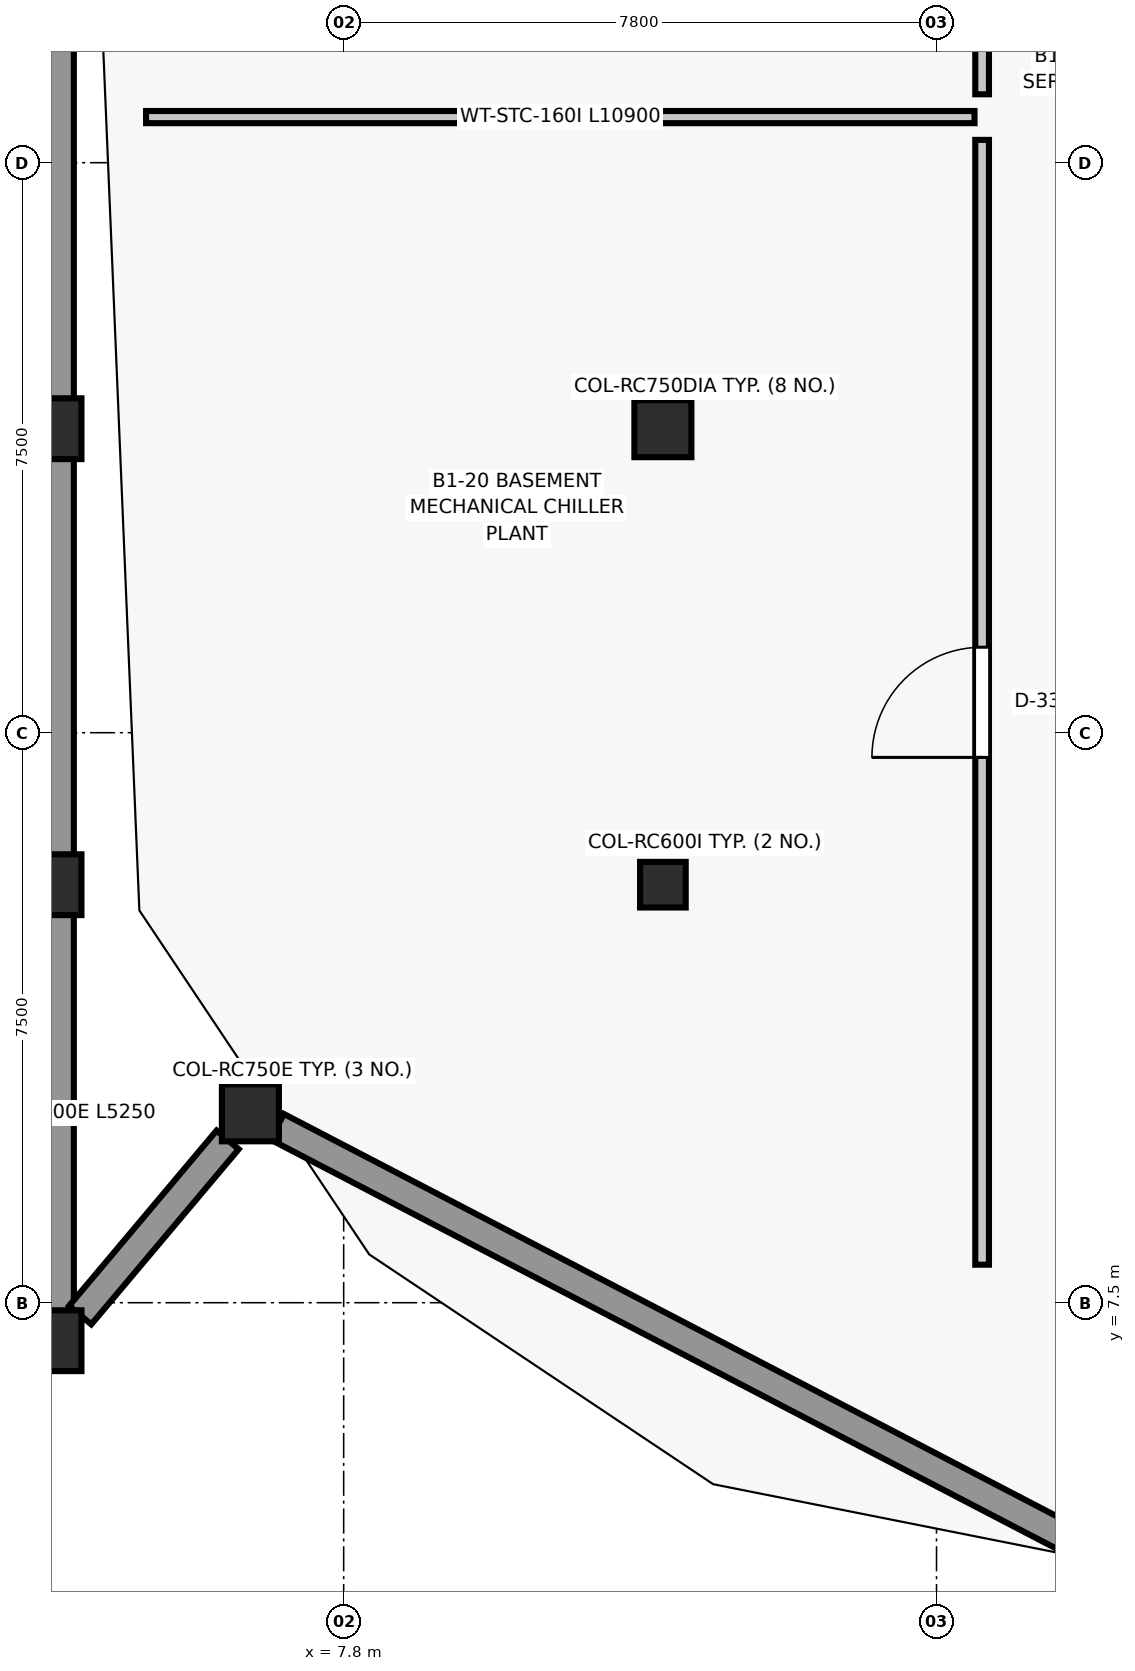
"""IFC4 building model, lengths in metres.
Left out: names, types, materials, properties, quantities, classifications, styles, units other than length and angle.
Written with IfcOpenShell. Run it as: python <this file> out.ifc"""

import sys

from ifc_helpers import new_model, si_unit, direction, frame, frame_2d, origin, origin_2d, place, context, subcontext, project, spatial, rectangle, circle, extrude, element, fill, save


model = new_model("IFC4")
c1 = context("Model", 3, precision=1e-05, world=origin(), true_north=direction((0.0, 1.0)))
c2 = subcontext(c1, "Body", "Model", "MODEL_VIEW")
j1 = project(units=[si_unit("LENGTHUNIT", "METRE"), si_unit("PLANEANGLEUNIT", "RADIAN")], contexts=[c1])
p1 = place(None, origin())
s1 = spatial("IfcSite", under=j1, at=p1, CompositionType="ELEMENT")
p2 = place(p1, origin())
s2 = spatial("IfcBuilding", under=s1, at=p2, CompositionType="ELEMENT")
p3 = place(p2, frame((0.0, 0.0, -4.2)))
s3 = spatial("IfcBuildingStorey", under=s2, at=p3, CompositionType="ELEMENT", Elevation=-4.2)
p4 = place(p3, frame((6.573, 9.999, 0.0), z_axis=(0.0, 0.0, 1.0), x_axis=(1.0, 0.0, 0.0)))
e1 = element("IfcColumn", 1, at=p4, inside=s3, PredefinedType="COLUMN", context=c2, shape_type="SweptSolid", body=[
    extrude(rectangle(XDim=0.75, YDim=0.75, at=origin_2d()), origin(), (0.0, 0.0, 1.0), 4.2),
])
p5 = place(p3, frame((12.0, 13.0, 0.0), z_axis=(0.0, 0.0, 1.0), x_axis=(1.0, 0.0, 0.0)))
e2 = element("IfcColumn", 2, at=p5, inside=s3, PredefinedType="COLUMN", context=c2, shape_type="SweptSolid", body=[
    extrude(rectangle(XDim=0.6, YDim=0.6, at=origin_2d()), origin(), (0.0, 0.0, 1.0), 4.2),
])
p6 = place(p3, frame((12.0, 19.0, 0.0), z_axis=(0.0, 0.0, 1.0), x_axis=(1.0, 0.0, 0.0)))
e3 = element("IfcColumn", 3, at=p6, inside=s3, PredefinedType="COLUMN", context=c2, shape_type="SweptSolid", body=[
    extrude(circle(Radius=0.375, at=origin_2d()), origin(), (0.0, 0.0, 1.0), 4.2),
])
for number, where, z_axis, x_axis in (
    (4, (4.05, 7.0, 0.0), (0.0, 0.0, 1.0), (1.0, 0.0, 0.0)),
    (5, (4.05, 13.0, 0.0), (0.0, 0.0, 1.0), (1.0, 0.0, 0.0)),
    (6, (4.05, 19.0, 0.0), (0.0, 0.0, 1.0), (1.0, 0.0, 0.0)),
):
    element("IfcColumn", number, at=place(p3, frame(where, z_axis=z_axis, x_axis=x_axis)), inside=s3, PredefinedType="COLUMN", context=c2, shape_type="SweptSolid", body=[
        extrude(rectangle(XDim=0.6, YDim=0.8, at=origin_2d()), origin(), (0.0, 0.0, 1.0), 4.2),
    ])
for number, where, z_axis, x_axis in (
    (7, (4.05, 7.375, 0.0), (0.0, 0.0, 1.0), (0.0, 1.0, 0.0)),
    (8, (4.05, 13.375, 0.0), (0.0, 0.0, 1.0), (0.0, 1.0, 0.0)),
    (9, (4.05, 19.375, 0.0), (0.0, 0.0, 1.0), (0.0, 1.0, 0.0)),
):
    element("IfcWall", number, at=place(p3, frame(where, z_axis=z_axis, x_axis=x_axis)), inside=s3, PredefinedType="SHEAR", context=c2, shape_type="SweptSolid", body=[
        extrude(rectangle(XDim=5.25, YDim=0.4, at=frame_2d((2.625, 0.0))), origin(), (0.0, 0.0, 1.0), 4.2),
    ])
p7 = place(p3, frame((17.647, 4.234, 0.0), z_axis=(0.0, 0.0, 1.0), x_axis=(-0.887012674584, 0.46174507591, 0.0)))
e10 = element("IfcWall", 10, at=p7, inside=s3, PredefinedType="SHEAR", context=c2, shape_type="SweptSolid", body=[
    extrude(rectangle(XDim=12.087, YDim=0.38, at=frame_2d((6.044, 0.0))), origin(), (0.0, 0.0, 1.0), 4.2),
])
p8 = place(p3, frame((6.273, 9.643, 0.0), z_axis=(0.0, 0.0, 1.0), x_axis=(-0.643796278673, -0.765196936459, 0.0)))
e11 = element("IfcWall", 11, at=p8, inside=s3, PredefinedType="SHEAR", context=c2, shape_type="SweptSolid", body=[
    extrude(rectangle(XDim=3.012, YDim=0.38, at=frame_2d((1.506, 0.0))), origin(), (0.0, 0.0, 1.0), 4.2),
])
p9 = place(p3, frame((16.2, 8.0, 0.0), z_axis=(0.0, 0.0, 1.0), x_axis=(0.0, 1.0, 0.0)))
e12 = element("IfcWall", 12, at=p9, inside=s3, PredefinedType="PARTITIONING", context=c2, shape_type="SweptSolid", body=[
    extrude(rectangle(XDim=14.8, YDim=0.18, at=frame_2d((7.4, 0.0))), origin(), (0.0, 0.0, 1.0), 3.895),
])
p10 = place(p9, frame((6.675, 0.0, 0.0)))
e13 = element("IfcOpeningElement", 13, at=p10, cuts=e12, PredefinedType="OPENING", context=c2, shape_type="SweptSolid", body=[
    extrude(rectangle(XDim=1.45, YDim=2.2, at=frame_2d((0.725, 1.1))), frame((0.0, 0.1, 0.0), z_axis=(0.0, -1.0, 0.0), x_axis=(1.0, 0.0, 0.0)), (0.0, 0.0, 1.0), 0.2),
])
p11 = place(p3, frame((16.2, 23.4, 0.0), z_axis=(0.0, 0.0, 1.0), x_axis=(0.0, 1.0, 0.0)))
e14 = element("IfcWall", 14, at=p11, inside=s3, PredefinedType="PARTITIONING", context=c2, shape_type="SweptSolid", body=[
    extrude(rectangle(XDim=16.6, YDim=0.18, at=frame_2d((8.3, 0.0))), origin(), (0.0, 0.0, 1.0), 3.895),
])
p12 = place(p11, frame((7.575, 0.0, 0.0)))
e15 = element("IfcOpeningElement", 15, at=p12, cuts=e14, PredefinedType="OPENING", context=c2, shape_type="SweptSolid", body=[
    extrude(rectangle(XDim=1.45, YDim=2.2, at=frame_2d((0.725, 1.1))), frame((0.0, 0.1, 0.0), z_axis=(0.0, -1.0, 0.0), x_axis=(1.0, 0.0, 0.0)), (0.0, 0.0, 1.0), 0.2),
])
p13 = place(p3, frame((5.2, 23.1, 0.0), z_axis=(0.0, 0.0, 1.0), x_axis=(1.0, 0.0, 0.0)))
e16 = element("IfcWall", 16, at=p13, inside=s3, PredefinedType="PARTITIONING", context=c2, shape_type="SweptSolid", body=[
    extrude(rectangle(XDim=10.9, YDim=0.16, at=frame_2d((5.45, 0.0))), origin(), (0.0, 0.0, 1.0), 3.895),
])
p14 = place(p10, origin())
e17 = element("IfcDoor", 17, at=p14, inside=s3, OperationType="SINGLE_SWING_LEFT", PredefinedType="DOOR", context=c2, shape_type="SweptSolid", body=[
    extrude(rectangle(XDim=1.45, YDim=2.2, at=frame_2d((0.725, 1.1))), frame((0.0, 0.025, 0.0), z_axis=(0.0, -1.0, 0.0), x_axis=(1.0, 0.0, 0.0)), (0.0, 0.0, 1.0), 0.05),
])
fill(e13, e17)
save(model, sys.argv[1])
